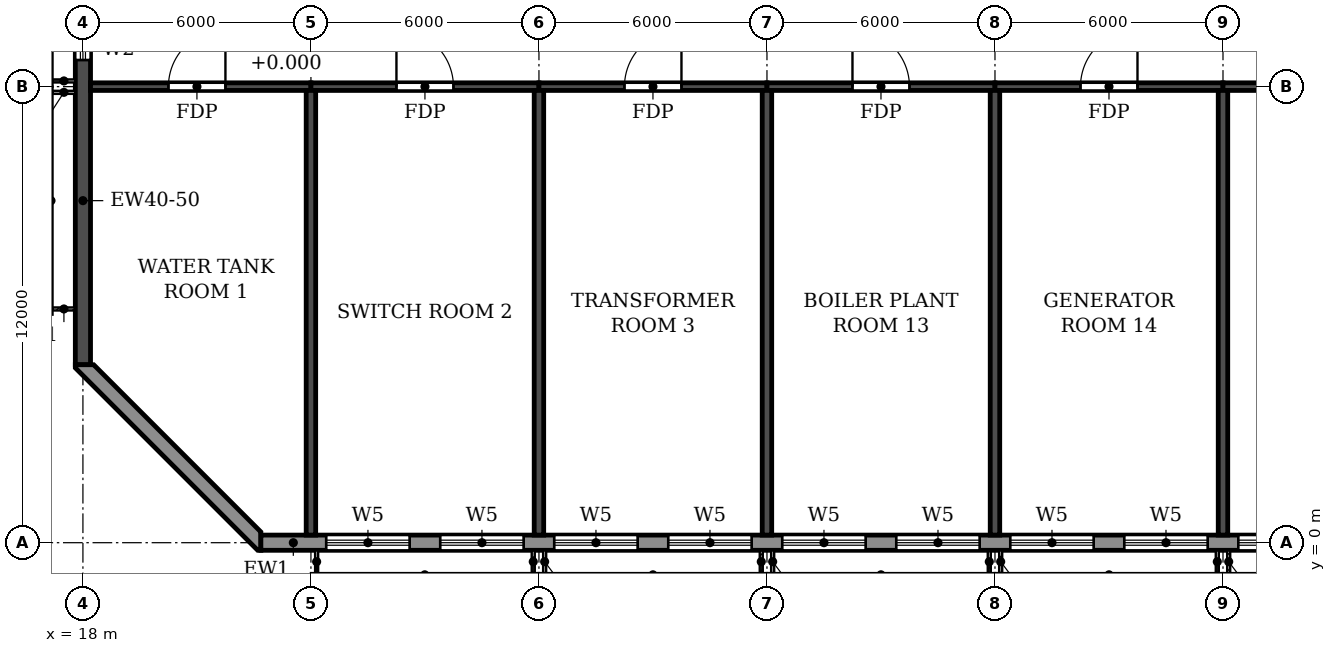
"""IFC4 building model, lengths in metres.
Left out: names, types, materials, properties, quantities, classifications, styles, units other than length and angle.
Written with IfcOpenShell. Run it as: python <this file> out.ifc"""

import sys

from ifc_helpers import new_model, si_unit, direction, frame, frame_2d, origin, place, context, subcontext, project, spatial, polyline, rectangle, outline, extrude, element, fill, save


model = new_model("IFC4")
c1 = context("Model", 3, precision=1e-05, world=origin(), true_north=direction((0.0, 1.0)))
c2 = subcontext(c1, "Body", "Model", "MODEL_VIEW")
j1 = project(units=[si_unit("LENGTHUNIT", "METRE"), si_unit("PLANEANGLEUNIT", "RADIAN")], contexts=[c1])
p1 = place(None, origin())
s1 = spatial("IfcSite", under=j1, at=p1, CompositionType="ELEMENT")
p2 = place(p1, origin())
s2 = spatial("IfcBuilding", under=s1, at=p2, CompositionType="ELEMENT")
p3 = place(p2, frame((0.0, 0.0, 267.0)))
s3 = spatial("IfcBuildingStorey", under=s2, at=p3, CompositionType="ELEMENT", Elevation=267.0)
for number, where, z_axis, x_axis in (
    (1, (24.0, 0.2, 0.0), (0.0, 0.0, 1.0), (0.0, 1.0, 0.0)),
    (2, (30.0, 0.2, 0.0), (0.0, 0.0, 1.0), (0.0, 1.0, 0.0)),
    (3, (36.0, 0.2, 0.0), (0.0, 0.0, 1.0), (0.0, 1.0, 0.0)),
    (4, (42.0, 0.2, 0.0), (0.0, 0.0, 1.0), (0.0, 1.0, 0.0)),
    (5, (48.0, 0.2, 0.0), (0.0, 0.0, 1.0), (0.0, 1.0, 0.0)),
):
    element("IfcWall", number, at=place(p3, frame(where, z_axis=z_axis, x_axis=x_axis)), inside=s3, PredefinedType="SHEAR", context=c2, shape_type="SweptSolid", body=[
        extrude(rectangle(XDim=11.7, YDim=0.25, at=frame_2d((5.85, 0.0))), origin(), (0.0, 0.0, 1.0), 5.15),
    ])
p4 = place(p3, frame((18.0, 4.683, 0.0), z_axis=(0.0, 0.0, 1.0), x_axis=(0.0, 1.0, 0.0)))
e6 = element("IfcWall", 6, at=p4, inside=s3, PredefinedType="SHEAR", context=c2, shape_type="SweptSolid", body=[
    extrude(rectangle(XDim=31.834, YDim=0.4, at=frame_2d((15.917, 0.0))), origin(), (0.0, 0.0, 1.0), 5.15),
])
p5 = place(p4, frame((23.817, 0.0, 0.9)))
e7 = element("IfcOpeningElement", 7, at=p5, cuts=e6, PredefinedType="OPENING", context=c2, shape_type="SweptSolid", body=[
    extrude(rectangle(XDim=1.2, YDim=1.5, at=frame_2d((0.6, 0.75))), frame((0.0, 0.21, 0.0), z_axis=(0.0, -1.0, 0.0), x_axis=(1.0, 0.0, 0.0)), (0.0, 0.0, 1.0), 0.42),
])
p6 = place(p4, frame((8.017, 0.0, 0.9)))
e8 = element("IfcOpeningElement", 8, at=p6, cuts=e6, PredefinedType="OPENING", context=c2, shape_type="SweptSolid", body=[
    extrude(rectangle(XDim=1.2, YDim=1.5, at=frame_2d((0.6, 0.75))), frame((0.0, 0.21, 0.0), z_axis=(0.0, -1.0, 0.0), x_axis=(1.0, 0.0, 0.0)), (0.0, 0.0, 1.0), 0.42),
])
p7 = place(p4, frame((15.917, 0.0, 0.9)))
e9 = element("IfcOpeningElement", 9, at=p7, cuts=e6, PredefinedType="OPENING", context=c2, shape_type="SweptSolid", body=[
    extrude(rectangle(XDim=1.2, YDim=1.5, at=frame_2d((0.6, 0.75))), frame((0.0, 0.21, 0.0), z_axis=(0.0, -1.0, 0.0), x_axis=(1.0, 0.0, 0.0)), (0.0, 0.0, 1.0), 0.42),
])
p8 = place(p3, frame((18.2, 12.0, 0.0), z_axis=(0.0, 0.0, 1.0), x_axis=(1.0, 0.0, 0.0)))
e10 = element("IfcWall", 10, at=p8, inside=s3, PredefinedType="SHEAR", context=c2, shape_type="SweptSolid", body=[
    extrude(rectangle(XDim=5.8, YDim=0.2, at=frame_2d((2.9, 0.0))), origin(), (0.0, 0.0, 1.0), 4.55),
])
p9 = place(p8, frame((2.05, 0.0, 0.0)))
e11 = element("IfcOpeningElement", 11, at=p9, cuts=e10, PredefinedType="OPENING", context=c2, shape_type="SweptSolid", body=[
    extrude(rectangle(XDim=1.5, YDim=2.1, at=frame_2d((0.75, 1.05))), frame((0.0, 0.11, 0.0), z_axis=(0.0, -1.0, 0.0), x_axis=(1.0, 0.0, 0.0)), (0.0, 0.0, 1.0), 0.22),
])
p10 = place(p3, frame((24.0, 12.0, 0.0), z_axis=(0.0, 0.0, 1.0), x_axis=(1.0, 0.0, 0.0)))
e12 = element("IfcWall", 12, at=p10, inside=s3, PredefinedType="SHEAR", context=c2, shape_type="SweptSolid", body=[
    extrude(rectangle(XDim=6.0, YDim=0.2, at=frame_2d((3.0, 0.0))), origin(), (0.0, 0.0, 1.0), 4.55),
])
p11 = place(p10, frame((2.25, 0.0, 0.0)))
e13 = element("IfcOpeningElement", 13, at=p11, cuts=e12, PredefinedType="OPENING", context=c2, shape_type="SweptSolid", body=[
    extrude(rectangle(XDim=1.5, YDim=2.1, at=frame_2d((0.75, 1.05))), frame((0.0, 0.11, 0.0), z_axis=(0.0, -1.0, 0.0), x_axis=(1.0, 0.0, 0.0)), (0.0, 0.0, 1.0), 0.22),
])
p12 = place(p3, frame((30.0, 12.0, 0.0), z_axis=(0.0, 0.0, 1.0), x_axis=(1.0, 0.0, 0.0)))
e14 = element("IfcWall", 14, at=p12, inside=s3, PredefinedType="SHEAR", context=c2, shape_type="SweptSolid", body=[
    extrude(rectangle(XDim=6.0, YDim=0.2, at=frame_2d((3.0, 0.0))), origin(), (0.0, 0.0, 1.0), 4.55),
])
p13 = place(p12, frame((2.25, 0.0, 0.0)))
e15 = element("IfcOpeningElement", 15, at=p13, cuts=e14, PredefinedType="OPENING", context=c2, shape_type="SweptSolid", body=[
    extrude(rectangle(XDim=1.5, YDim=2.1, at=frame_2d((0.75, 1.05))), frame((0.0, 0.11, 0.0), z_axis=(0.0, -1.0, 0.0), x_axis=(1.0, 0.0, 0.0)), (0.0, 0.0, 1.0), 0.22),
])
p14 = place(p3, frame((36.0, 12.0, 0.0), z_axis=(0.0, 0.0, 1.0), x_axis=(1.0, 0.0, 0.0)))
e16 = element("IfcWall", 16, at=p14, inside=s3, PredefinedType="SHEAR", context=c2, shape_type="SweptSolid", body=[
    extrude(rectangle(XDim=6.0, YDim=0.2, at=frame_2d((3.0, 0.0))), origin(), (0.0, 0.0, 1.0), 4.55),
])
p15 = place(p14, frame((2.25, 0.0, 0.0)))
e17 = element("IfcOpeningElement", 17, at=p15, cuts=e16, PredefinedType="OPENING", context=c2, shape_type="SweptSolid", body=[
    extrude(rectangle(XDim=1.5, YDim=2.1, at=frame_2d((0.75, 1.05))), frame((0.0, 0.11, 0.0), z_axis=(0.0, -1.0, 0.0), x_axis=(1.0, 0.0, 0.0)), (0.0, 0.0, 1.0), 0.22),
])
p16 = place(p3, frame((42.0, 12.0, 0.0), z_axis=(0.0, 0.0, 1.0), x_axis=(1.0, 0.0, 0.0)))
e18 = element("IfcWall", 18, at=p16, inside=s3, PredefinedType="SHEAR", context=c2, shape_type="SweptSolid", body=[
    extrude(rectangle(XDim=6.0, YDim=0.2, at=frame_2d((3.0, 0.0))), origin(), (0.0, 0.0, 1.0), 4.55),
])
p17 = place(p16, frame((2.25, 0.0, 0.0)))
e19 = element("IfcOpeningElement", 19, at=p17, cuts=e18, PredefinedType="OPENING", context=c2, shape_type="SweptSolid", body=[
    extrude(rectangle(XDim=1.5, YDim=2.1, at=frame_2d((0.75, 1.05))), frame((0.0, 0.11, 0.0), z_axis=(0.0, -1.0, 0.0), x_axis=(1.0, 0.0, 0.0)), (0.0, 0.0, 1.0), 0.22),
])
p18 = place(p3, frame((48.0, 12.0, 0.0), z_axis=(0.0, 0.0, 1.0), x_axis=(1.0, 0.0, 0.0)))
e20 = element("IfcWall", 20, at=p18, inside=s3, PredefinedType="SHEAR", context=c2, shape_type="SweptSolid", body=[
    extrude(rectangle(XDim=6.0, YDim=0.2, at=frame_2d((3.0, 0.0))), origin(), (0.0, 0.0, 1.0), 4.55),
])
p19 = place(p18, frame((2.25, 0.0, 0.0)))
e21 = element("IfcOpeningElement", 21, at=p19, cuts=e20, PredefinedType="OPENING", context=c2, shape_type="SweptSolid", body=[
    extrude(rectangle(XDim=1.5, YDim=2.1, at=frame_2d((0.75, 1.05))), frame((0.0, 0.11, 0.0), z_axis=(0.0, -1.0, 0.0), x_axis=(1.0, 0.0, 0.0)), (0.0, 0.0, 1.0), 0.22),
])
p20 = place(p3, frame((22.683, 0.0, 0.0), z_axis=(0.0, 0.0, 1.0), x_axis=(1.0, 0.0, 0.0)))
e22 = element("IfcWall", 22, at=p20, inside=s3, PredefinedType="STANDARD", context=c2, shape_type="SweptSolid", body=[
    extrude(rectangle(XDim=56.634, YDim=0.4, at=frame_2d((28.317, 0.0))), origin(), (0.0, 0.0, 1.0), 5.15),
])
p21 = place(p20, frame((1.717, 0.0, 0.6)))
e23 = element("IfcOpeningElement", 23, at=p21, cuts=e22, PredefinedType="OPENING", context=c2, shape_type="SweptSolid", body=[
    extrude(rectangle(XDim=2.2, YDim=2.4, at=frame_2d((1.1, 1.2))), frame((0.0, 0.21, 0.0), z_axis=(0.0, -1.0, 0.0), x_axis=(1.0, 0.0, 0.0)), (0.0, 0.0, 1.0), 0.42),
])
p22 = place(p20, frame((4.717, 0.0, 0.6)))
e24 = element("IfcOpeningElement", 24, at=p22, cuts=e22, PredefinedType="OPENING", context=c2, shape_type="SweptSolid", body=[
    extrude(rectangle(XDim=2.2, YDim=2.4, at=frame_2d((1.1, 1.2))), frame((0.0, 0.21, 0.0), z_axis=(0.0, -1.0, 0.0), x_axis=(1.0, 0.0, 0.0)), (0.0, 0.0, 1.0), 0.42),
])
p23 = place(p20, frame((7.717, 0.0, 0.6)))
e25 = element("IfcOpeningElement", 25, at=p23, cuts=e22, PredefinedType="OPENING", context=c2, shape_type="SweptSolid", body=[
    extrude(rectangle(XDim=2.2, YDim=2.4, at=frame_2d((1.1, 1.2))), frame((0.0, 0.21, 0.0), z_axis=(0.0, -1.0, 0.0), x_axis=(1.0, 0.0, 0.0)), (0.0, 0.0, 1.0), 0.42),
])
p24 = place(p20, frame((10.717, 0.0, 0.6)))
e26 = element("IfcOpeningElement", 26, at=p24, cuts=e22, PredefinedType="OPENING", context=c2, shape_type="SweptSolid", body=[
    extrude(rectangle(XDim=2.2, YDim=2.4, at=frame_2d((1.1, 1.2))), frame((0.0, 0.21, 0.0), z_axis=(0.0, -1.0, 0.0), x_axis=(1.0, 0.0, 0.0)), (0.0, 0.0, 1.0), 0.42),
])
p25 = place(p20, frame((13.717, 0.0, 0.6)))
e27 = element("IfcOpeningElement", 27, at=p25, cuts=e22, PredefinedType="OPENING", context=c2, shape_type="SweptSolid", body=[
    extrude(rectangle(XDim=2.2, YDim=2.4, at=frame_2d((1.1, 1.2))), frame((0.0, 0.21, 0.0), z_axis=(0.0, -1.0, 0.0), x_axis=(1.0, 0.0, 0.0)), (0.0, 0.0, 1.0), 0.42),
])
p26 = place(p20, frame((16.717, 0.0, 0.6)))
e28 = element("IfcOpeningElement", 28, at=p26, cuts=e22, PredefinedType="OPENING", context=c2, shape_type="SweptSolid", body=[
    extrude(rectangle(XDim=2.2, YDim=2.4, at=frame_2d((1.1, 1.2))), frame((0.0, 0.21, 0.0), z_axis=(0.0, -1.0, 0.0), x_axis=(1.0, 0.0, 0.0)), (0.0, 0.0, 1.0), 0.42),
])
p27 = place(p20, frame((19.717, 0.0, 0.6)))
e29 = element("IfcOpeningElement", 29, at=p27, cuts=e22, PredefinedType="OPENING", context=c2, shape_type="SweptSolid", body=[
    extrude(rectangle(XDim=2.2, YDim=2.4, at=frame_2d((1.1, 1.2))), frame((0.0, 0.21, 0.0), z_axis=(0.0, -1.0, 0.0), x_axis=(1.0, 0.0, 0.0)), (0.0, 0.0, 1.0), 0.42),
])
p28 = place(p20, frame((22.717, 0.0, 0.6)))
e30 = element("IfcOpeningElement", 30, at=p28, cuts=e22, PredefinedType="OPENING", context=c2, shape_type="SweptSolid", body=[
    extrude(rectangle(XDim=2.2, YDim=2.4, at=frame_2d((1.1, 1.2))), frame((0.0, 0.21, 0.0), z_axis=(0.0, -1.0, 0.0), x_axis=(1.0, 0.0, 0.0)), (0.0, 0.0, 1.0), 0.42),
])
p29 = place(p20, frame((25.717, 0.0, 0.6)))
e31 = element("IfcOpeningElement", 31, at=p29, cuts=e22, PredefinedType="OPENING", context=c2, shape_type="SweptSolid", body=[
    extrude(rectangle(XDim=2.2, YDim=2.4, at=frame_2d((1.1, 1.2))), frame((0.0, 0.21, 0.0), z_axis=(0.0, -1.0, 0.0), x_axis=(1.0, 0.0, 0.0)), (0.0, 0.0, 1.0), 0.42),
])
p30 = place(p20, frame((28.717, 0.0, 0.6)))
e32 = element("IfcOpeningElement", 32, at=p30, cuts=e22, PredefinedType="OPENING", context=c2, shape_type="SweptSolid", body=[
    extrude(rectangle(XDim=2.2, YDim=2.4, at=frame_2d((1.1, 1.2))), frame((0.0, 0.21, 0.0), z_axis=(0.0, -1.0, 0.0), x_axis=(1.0, 0.0, 0.0)), (0.0, 0.0, 1.0), 0.42),
])
p31 = place(p20, frame((31.717, 0.0, 0.6)))
e33 = element("IfcOpeningElement", 33, at=p31, cuts=e22, PredefinedType="OPENING", context=c2, shape_type="SweptSolid", body=[
    extrude(rectangle(XDim=2.2, YDim=2.4, at=frame_2d((1.1, 1.2))), frame((0.0, 0.21, 0.0), z_axis=(0.0, -1.0, 0.0), x_axis=(1.0, 0.0, 0.0)), (0.0, 0.0, 1.0), 0.42),
])
p32 = place(p20, frame((34.717, 0.0, 0.6)))
e34 = element("IfcOpeningElement", 34, at=p32, cuts=e22, PredefinedType="OPENING", context=c2, shape_type="SweptSolid", body=[
    extrude(rectangle(XDim=2.2, YDim=2.4, at=frame_2d((1.1, 1.2))), frame((0.0, 0.21, 0.0), z_axis=(0.0, -1.0, 0.0), x_axis=(1.0, 0.0, 0.0)), (0.0, 0.0, 1.0), 0.42),
])
p33 = place(p20, frame((37.717, 0.0, 0.6)))
e35 = element("IfcOpeningElement", 35, at=p33, cuts=e22, PredefinedType="OPENING", context=c2, shape_type="SweptSolid", body=[
    extrude(rectangle(XDim=2.2, YDim=2.4, at=frame_2d((1.1, 1.2))), frame((0.0, 0.21, 0.0), z_axis=(0.0, -1.0, 0.0), x_axis=(1.0, 0.0, 0.0)), (0.0, 0.0, 1.0), 0.42),
])
p34 = place(p20, frame((40.717, 0.0, 0.6)))
e36 = element("IfcOpeningElement", 36, at=p34, cuts=e22, PredefinedType="OPENING", context=c2, shape_type="SweptSolid", body=[
    extrude(rectangle(XDim=2.2, YDim=2.4, at=frame_2d((1.1, 1.2))), frame((0.0, 0.21, 0.0), z_axis=(0.0, -1.0, 0.0), x_axis=(1.0, 0.0, 0.0)), (0.0, 0.0, 1.0), 0.42),
])
p35 = place(p20, frame((43.717, 0.0, 0.6)))
e37 = element("IfcOpeningElement", 37, at=p35, cuts=e22, PredefinedType="OPENING", context=c2, shape_type="SweptSolid", body=[
    extrude(rectangle(XDim=2.2, YDim=2.4, at=frame_2d((1.1, 1.2))), frame((0.0, 0.21, 0.0), z_axis=(0.0, -1.0, 0.0), x_axis=(1.0, 0.0, 0.0)), (0.0, 0.0, 1.0), 0.42),
])
p36 = place(p20, frame((46.717, 0.0, 0.6)))
e38 = element("IfcOpeningElement", 38, at=p36, cuts=e22, PredefinedType="OPENING", context=c2, shape_type="SweptSolid", body=[
    extrude(rectangle(XDim=2.2, YDim=2.4, at=frame_2d((1.1, 1.2))), frame((0.0, 0.21, 0.0), z_axis=(0.0, -1.0, 0.0), x_axis=(1.0, 0.0, 0.0)), (0.0, 0.0, 1.0), 0.42),
])
p37 = place(p20, frame((49.717, 0.0, 0.6)))
e39 = element("IfcOpeningElement", 39, at=p37, cuts=e22, PredefinedType="OPENING", context=c2, shape_type="SweptSolid", body=[
    extrude(rectangle(XDim=2.2, YDim=2.4, at=frame_2d((1.1, 1.2))), frame((0.0, 0.21, 0.0), z_axis=(0.0, -1.0, 0.0), x_axis=(1.0, 0.0, 0.0)), (0.0, 0.0, 1.0), 0.42),
])
p38 = place(p20, frame((52.717, 0.0, 0.6)))
e40 = element("IfcOpeningElement", 40, at=p38, cuts=e22, PredefinedType="OPENING", context=c2, shape_type="SweptSolid", body=[
    extrude(rectangle(XDim=2.2, YDim=2.4, at=frame_2d((1.1, 1.2))), frame((0.0, 0.21, 0.0), z_axis=(0.0, -1.0, 0.0), x_axis=(1.0, 0.0, 0.0)), (0.0, 0.0, 1.0), 0.42),
])
p39 = place(p3, origin())
e41 = element("IfcWall", 41, at=p39, inside=s3, PredefinedType="STANDARD", context=c2, shape_type="SweptSolid", body=[
    extrude(outline(polyline([(17.8, 4.683), (17.8, 4.6), (22.6, -0.2), (22.683, -0.2), (22.683, 0.283), (18.283, 4.683), (17.8, 4.683)])), origin(), (0.0, 0.0, 1.0), 5.15),
])
p40 = place(p21, origin())
e42 = element("IfcWindow", 42, at=p40, inside=s3, PartitioningType="TRIPLE_PANEL_HORIZONTAL", PredefinedType="WINDOW", context=c2, shape_type="SweptSolid", body=[
    extrude(rectangle(XDim=2.2, YDim=2.4, at=frame_2d((1.1, 1.2))), frame((0.0, 0.03, 0.0), z_axis=(0.0, -1.0, 0.0), x_axis=(1.0, 0.0, 0.0)), (0.0, 0.0, 1.0), 0.06),
])
fill(e23, e42)
p41 = place(p22, origin())
e43 = element("IfcWindow", 43, at=p41, inside=s3, PartitioningType="TRIPLE_PANEL_HORIZONTAL", PredefinedType="WINDOW", context=c2, shape_type="SweptSolid", body=[
    extrude(rectangle(XDim=2.2, YDim=2.4, at=frame_2d((1.1, 1.2))), frame((0.0, 0.03, 0.0), z_axis=(0.0, -1.0, 0.0), x_axis=(1.0, 0.0, 0.0)), (0.0, 0.0, 1.0), 0.06),
])
fill(e24, e43)
p42 = place(p23, origin())
e44 = element("IfcWindow", 44, at=p42, inside=s3, PartitioningType="TRIPLE_PANEL_HORIZONTAL", PredefinedType="WINDOW", context=c2, shape_type="SweptSolid", body=[
    extrude(rectangle(XDim=2.2, YDim=2.4, at=frame_2d((1.1, 1.2))), frame((0.0, 0.03, 0.0), z_axis=(0.0, -1.0, 0.0), x_axis=(1.0, 0.0, 0.0)), (0.0, 0.0, 1.0), 0.06),
])
fill(e25, e44)
p43 = place(p24, origin())
e45 = element("IfcWindow", 45, at=p43, inside=s3, PartitioningType="TRIPLE_PANEL_HORIZONTAL", PredefinedType="WINDOW", context=c2, shape_type="SweptSolid", body=[
    extrude(rectangle(XDim=2.2, YDim=2.4, at=frame_2d((1.1, 1.2))), frame((0.0, 0.03, 0.0), z_axis=(0.0, -1.0, 0.0), x_axis=(1.0, 0.0, 0.0)), (0.0, 0.0, 1.0), 0.06),
])
fill(e26, e45)
p44 = place(p25, origin())
e46 = element("IfcWindow", 46, at=p44, inside=s3, PartitioningType="TRIPLE_PANEL_HORIZONTAL", PredefinedType="WINDOW", context=c2, shape_type="SweptSolid", body=[
    extrude(rectangle(XDim=2.2, YDim=2.4, at=frame_2d((1.1, 1.2))), frame((0.0, 0.03, 0.0), z_axis=(0.0, -1.0, 0.0), x_axis=(1.0, 0.0, 0.0)), (0.0, 0.0, 1.0), 0.06),
])
fill(e27, e46)
p45 = place(p26, origin())
e47 = element("IfcWindow", 47, at=p45, inside=s3, PartitioningType="TRIPLE_PANEL_HORIZONTAL", PredefinedType="WINDOW", context=c2, shape_type="SweptSolid", body=[
    extrude(rectangle(XDim=2.2, YDim=2.4, at=frame_2d((1.1, 1.2))), frame((0.0, 0.03, 0.0), z_axis=(0.0, -1.0, 0.0), x_axis=(1.0, 0.0, 0.0)), (0.0, 0.0, 1.0), 0.06),
])
fill(e28, e47)
p46 = place(p27, origin())
e48 = element("IfcWindow", 48, at=p46, inside=s3, PartitioningType="TRIPLE_PANEL_HORIZONTAL", PredefinedType="WINDOW", context=c2, shape_type="SweptSolid", body=[
    extrude(rectangle(XDim=2.2, YDim=2.4, at=frame_2d((1.1, 1.2))), frame((0.0, 0.03, 0.0), z_axis=(0.0, -1.0, 0.0), x_axis=(1.0, 0.0, 0.0)), (0.0, 0.0, 1.0), 0.06),
])
fill(e29, e48)
p47 = place(p28, origin())
e49 = element("IfcWindow", 49, at=p47, inside=s3, PartitioningType="TRIPLE_PANEL_HORIZONTAL", PredefinedType="WINDOW", context=c2, shape_type="SweptSolid", body=[
    extrude(rectangle(XDim=2.2, YDim=2.4, at=frame_2d((1.1, 1.2))), frame((0.0, 0.03, 0.0), z_axis=(0.0, -1.0, 0.0), x_axis=(1.0, 0.0, 0.0)), (0.0, 0.0, 1.0), 0.06),
])
fill(e30, e49)
p48 = place(p29, origin())
e50 = element("IfcWindow", 50, at=p48, inside=s3, PartitioningType="TRIPLE_PANEL_HORIZONTAL", PredefinedType="WINDOW", context=c2, shape_type="SweptSolid", body=[
    extrude(rectangle(XDim=2.2, YDim=2.4, at=frame_2d((1.1, 1.2))), frame((0.0, 0.03, 0.0), z_axis=(0.0, -1.0, 0.0), x_axis=(1.0, 0.0, 0.0)), (0.0, 0.0, 1.0), 0.06),
])
fill(e31, e50)
p49 = place(p6, origin())
e51 = element("IfcWindow", 51, at=p49, inside=s3, PartitioningType="SINGLE_PANEL", PredefinedType="WINDOW", context=c2, shape_type="SweptSolid", body=[
    extrude(rectangle(XDim=1.2, YDim=1.5, at=frame_2d((0.6, 0.75))), frame((0.0, 0.03, 0.0), z_axis=(0.0, -1.0, 0.0), x_axis=(1.0, 0.0, 0.0)), (0.0, 0.0, 1.0), 0.06),
])
fill(e8, e51)
p50 = place(p9, origin())
e52 = element("IfcDoor", 52, at=p50, inside=s3, OperationType="DOUBLE_DOOR_SINGLE_SWING", PredefinedType="DOOR", context=c2, shape_type="SweptSolid", body=[
    extrude(rectangle(XDim=1.5, YDim=2.1, at=frame_2d((0.75, 1.05))), frame((0.0, 0.025, 0.0), z_axis=(0.0, -1.0, 0.0), x_axis=(1.0, 0.0, 0.0)), (0.0, 0.0, 1.0), 0.05),
])
fill(e11, e52)
p51 = place(p11, origin())
e53 = element("IfcDoor", 53, at=p51, inside=s3, OperationType="DOUBLE_DOOR_SINGLE_SWING", PredefinedType="DOOR", context=c2, shape_type="SweptSolid", body=[
    extrude(rectangle(XDim=1.5, YDim=2.1, at=frame_2d((0.75, 1.05))), frame((0.0, 0.025, 0.0), z_axis=(0.0, -1.0, 0.0), x_axis=(1.0, 0.0, 0.0)), (0.0, 0.0, 1.0), 0.05),
])
fill(e13, e53)
p52 = place(p13, origin())
e54 = element("IfcDoor", 54, at=p52, inside=s3, OperationType="DOUBLE_DOOR_SINGLE_SWING", PredefinedType="DOOR", context=c2, shape_type="SweptSolid", body=[
    extrude(rectangle(XDim=1.5, YDim=2.1, at=frame_2d((0.75, 1.05))), frame((0.0, 0.025, 0.0), z_axis=(0.0, -1.0, 0.0), x_axis=(1.0, 0.0, 0.0)), (0.0, 0.0, 1.0), 0.05),
])
fill(e15, e54)
p53 = place(p15, origin())
e55 = element("IfcDoor", 55, at=p53, inside=s3, OperationType="DOUBLE_DOOR_SINGLE_SWING", PredefinedType="DOOR", context=c2, shape_type="SweptSolid", body=[
    extrude(rectangle(XDim=1.5, YDim=2.1, at=frame_2d((0.75, 1.05))), frame((0.0, 0.025, 0.0), z_axis=(0.0, -1.0, 0.0), x_axis=(1.0, 0.0, 0.0)), (0.0, 0.0, 1.0), 0.05),
])
fill(e17, e55)
p54 = place(p17, origin())
e56 = element("IfcDoor", 56, at=p54, inside=s3, OperationType="DOUBLE_DOOR_SINGLE_SWING", PredefinedType="DOOR", context=c2, shape_type="SweptSolid", body=[
    extrude(rectangle(XDim=1.5, YDim=2.1, at=frame_2d((0.75, 1.05))), frame((0.0, 0.025, 0.0), z_axis=(0.0, -1.0, 0.0), x_axis=(1.0, 0.0, 0.0)), (0.0, 0.0, 1.0), 0.05),
])
fill(e19, e56)
save(model, sys.argv[1])
